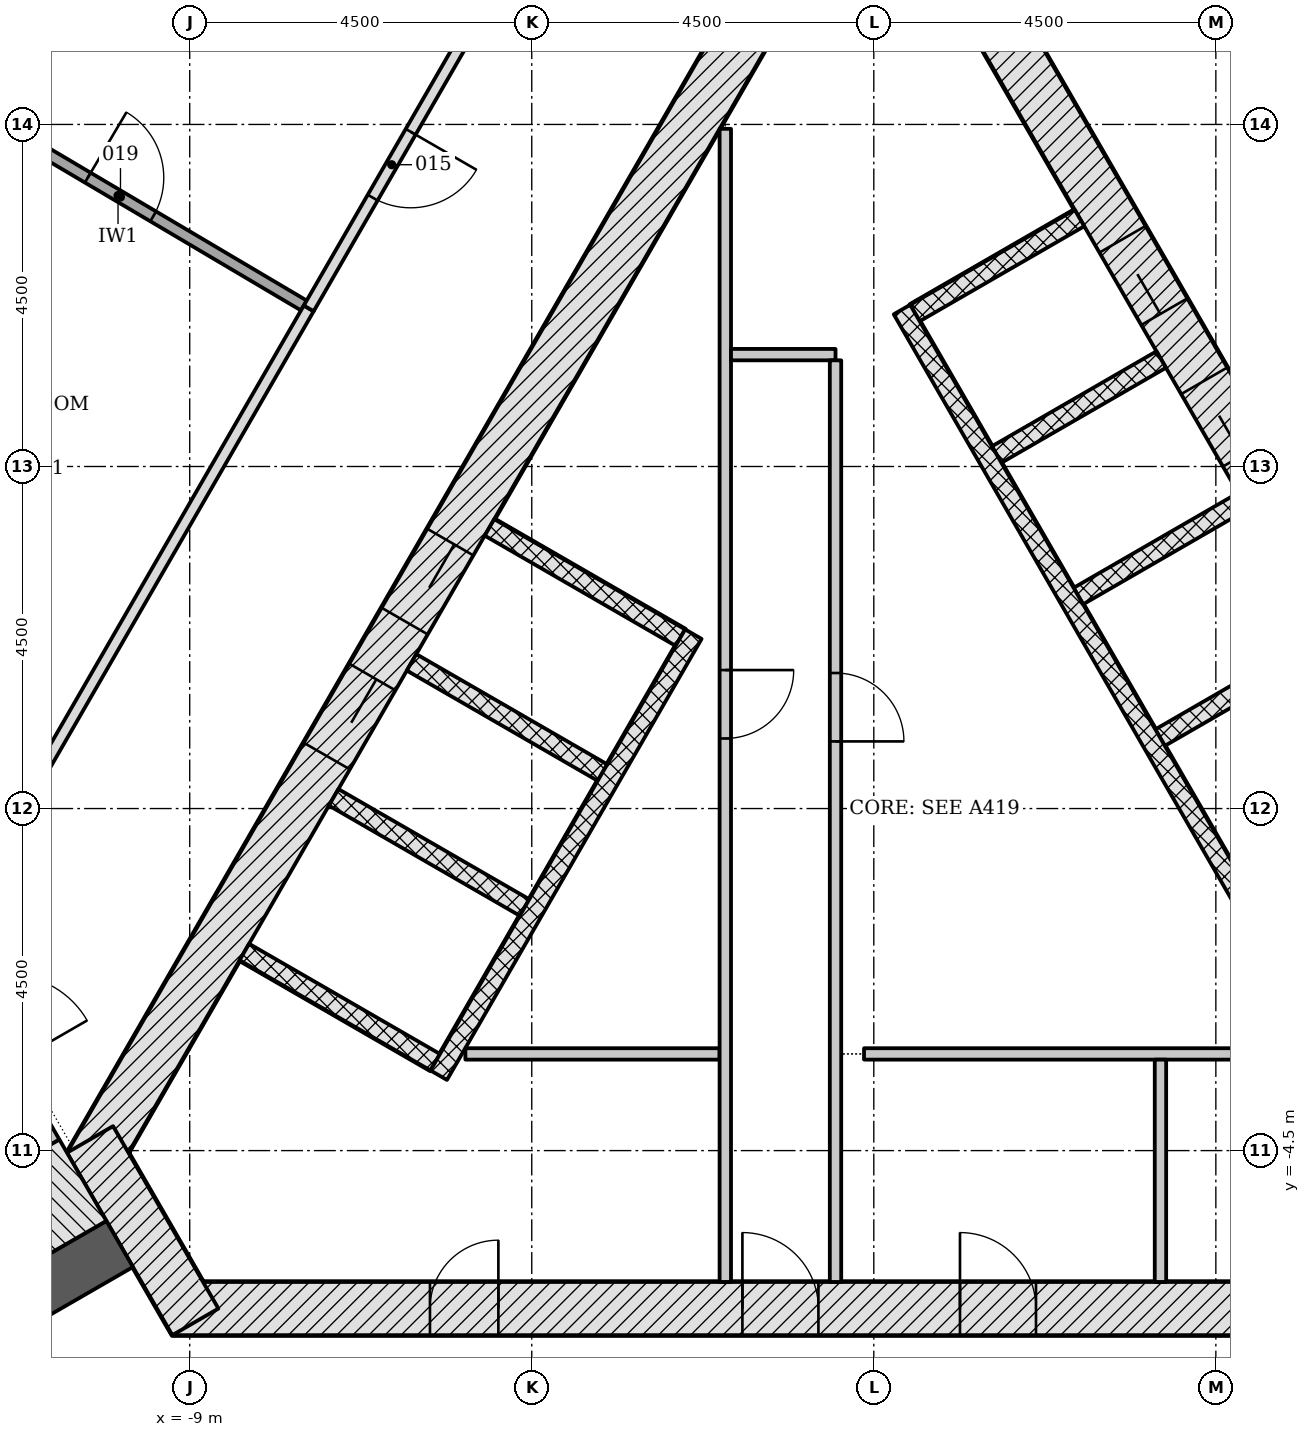
"""IFC4 building model, lengths in metres.
Left out: names, types, materials, properties, quantities, classifications, styles, units other than length and angle.
Written with IfcOpenShell. Run it as: python <this file> out.ifc"""

import sys

from ifc_helpers import new_model, si_unit, direction, frame, frame_2d, origin, place, context, subcontext, project, spatial, rectangle, extrude, element, fill, save


model = new_model("IFC4")
c1 = context("Model", 3, precision=1e-05, world=origin(), true_north=direction((0.0, 1.0)))
c2 = subcontext(c1, "Body", "Model", "MODEL_VIEW")
j1 = project(units=[si_unit("LENGTHUNIT", "METRE"), si_unit("PLANEANGLEUNIT", "RADIAN")], contexts=[c1])
p1 = place(None, origin())
s1 = spatial("IfcSite", under=j1, at=p1, CompositionType="ELEMENT")
p2 = place(p1, origin())
s2 = spatial("IfcBuilding", under=s1, at=p2, CompositionType="ELEMENT")
p3 = place(p2, frame((0.0, 0.0, 174.3)))
s3 = spatial("IfcBuildingStorey", under=s2, at=p3, CompositionType="ELEMENT", Elevation=174.3)
p4 = place(p3, frame((-9.229, -6.578, -0.2), z_axis=(0.0, 0.0, 1.0), x_axis=(1.0, 0.0, 0.0)))
e1 = element("IfcWall", 1, at=p4, inside=s3, PredefinedType="SHEAR", context=c2, shape_type="SweptSolid", body=[
    extrude(rectangle(XDim=18.458, YDim=0.7, at=frame_2d((9.229, 0.0))), origin(), (0.0, 0.0, 1.0), 3.6),
])
p5 = place(p4, frame((7.5, 0.0, 0.2)))
e2 = element("IfcOpeningElement", 2, at=p5, cuts=e1, PredefinedType="OPENING", context=c2, shape_type="SweptSolid", body=[
    extrude(rectangle(XDim=1.0, YDim=2.1, at=frame_2d((0.5, 1.05))), frame((0.0, 0.36, 0.0), z_axis=(0.0, -1.0, 0.0), x_axis=(1.0, 0.0, 0.0)), (0.0, 0.0, 1.0), 0.72),
])
p6 = place(p4, frame((3.389, 0.0, 0.2)))
e3 = element("IfcOpeningElement", 3, at=p6, cuts=e1, PredefinedType="OPENING", context=c2, shape_type="SweptSolid", body=[
    extrude(rectangle(XDim=0.9, YDim=2.1, at=frame_2d((0.45, 1.05))), frame((0.0, 0.36, 0.0), z_axis=(0.0, -1.0, 0.0), x_axis=(1.0, 0.0, 0.0)), (0.0, 0.0, 1.0), 0.72),
])
p7 = place(p4, frame((10.363, 0.0, 0.2)))
e4 = element("IfcOpeningElement", 4, at=p7, cuts=e1, PredefinedType="OPENING", context=c2, shape_type="SweptSolid", body=[
    extrude(rectangle(XDim=1.0, YDim=2.1, at=frame_2d((0.5, 1.05))), frame((0.0, 0.36, 0.0), z_axis=(0.0, -1.0, 0.0), x_axis=(1.0, 0.0, 0.0)), (0.0, 0.0, 1.0), 0.72),
])
p8 = place(p4, frame((15.077, 0.0, 0.2)))
e5 = element("IfcOpeningElement", 5, at=p8, cuts=e1, PredefinedType="OPENING", context=c2, shape_type="SweptSolid", body=[
    extrude(rectangle(XDim=0.9, YDim=2.1, at=frame_2d((0.45, 1.05))), frame((0.0, 0.36, 0.0), z_axis=(0.0, -1.0, 0.0), x_axis=(1.0, 0.0, 0.0)), (0.0, 0.0, 1.0), 0.72),
])
p9 = place(p3, frame((10.311, -4.703, -0.2), z_axis=(0.0, 0.0, 1.0), x_axis=(-0.500001446645, 0.866024568562, 0.0)))
e6 = element("IfcWall", 6, at=p9, inside=s3, PredefinedType="SHEAR", context=c2, shape_type="SweptSolid", body=[
    extrude(rectangle(XDim=18.458, YDim=0.7, at=frame_2d((9.229, 0.0))), origin(), (0.0, 0.0, 1.0), 3.6),
])
p10 = place(p9, frame((4.379, 0.0, 0.2)))
e7 = element("IfcOpeningElement", 7, at=p10, cuts=e6, PredefinedType="OPENING", context=c2, shape_type="SweptSolid", body=[
    extrude(rectangle(XDim=1.1, YDim=2.1, at=frame_2d((0.55, 1.05))), frame((0.0, 0.36, 0.0), z_axis=(0.0, -1.0, 0.0), x_axis=(1.0, 0.0, 0.0)), (0.0, 0.0, 1.0), 0.72),
])
p11 = place(p9, frame((6.529, 0.0, 0.2)))
e8 = element("IfcOpeningElement", 8, at=p11, cuts=e6, PredefinedType="OPENING", context=c2, shape_type="SweptSolid", body=[
    extrude(rectangle(XDim=1.1, YDim=2.1, at=frame_2d((0.55, 1.05))), frame((0.0, 0.36, 0.0), z_axis=(0.0, -1.0, 0.0), x_axis=(1.0, 0.0, 0.0)), (0.0, 0.0, 1.0), 0.72),
])
p12 = place(p9, frame((8.679, 0.0, 0.2)))
e9 = element("IfcOpeningElement", 9, at=p12, cuts=e6, PredefinedType="OPENING", context=c2, shape_type="SweptSolid", body=[
    extrude(rectangle(XDim=1.1, YDim=2.1, at=frame_2d((0.55, 1.05))), frame((0.0, 0.36, 0.0), z_axis=(0.0, -1.0, 0.0), x_axis=(1.0, 0.0, 0.0)), (0.0, 0.0, 1.0), 0.72),
])
p13 = place(p9, frame((10.829, 0.0, 0.2)))
e10 = element("IfcOpeningElement", 10, at=p13, cuts=e6, PredefinedType="OPENING", context=c2, shape_type="SweptSolid", body=[
    extrude(rectangle(XDim=1.1, YDim=2.1, at=frame_2d((0.55, 1.05))), frame((0.0, 0.36, 0.0), z_axis=(0.0, -1.0, 0.0), x_axis=(1.0, 0.0, 0.0)), (0.0, 0.0, 1.0), 0.72),
])
p14 = place(p9, frame((12.979, 0.0, 0.2)))
e11 = element("IfcOpeningElement", 11, at=p14, cuts=e6, PredefinedType="OPENING", context=c2, shape_type="SweptSolid", body=[
    extrude(rectangle(XDim=1.1, YDim=2.1, at=frame_2d((0.55, 1.05))), frame((0.0, 0.36, 0.0), z_axis=(0.0, -1.0, 0.0), x_axis=(1.0, 0.0, 0.0)), (0.0, 0.0, 1.0), 0.72),
])
p15 = place(p3, frame((-1.083, 11.281, -0.2), z_axis=(0.0, 0.0, 1.0), x_axis=(-0.500001446645, -0.866024568562, 0.0)))
e12 = element("IfcWall", 12, at=p15, inside=s3, PredefinedType="SHEAR", context=c2, shape_type="SweptSolid", body=[
    extrude(rectangle(XDim=18.458, YDim=0.7, at=frame_2d((9.229, 0.0))), origin(), (0.0, 0.0, 1.0), 3.6),
])
p16 = place(p15, frame((8.979, 0.0, 0.2)))
e13 = element("IfcOpeningElement", 13, at=p16, cuts=e12, PredefinedType="OPENING", context=c2, shape_type="SweptSolid", body=[
    extrude(rectangle(XDim=1.2, YDim=2.1, at=frame_2d((0.6, 1.05))), frame((0.0, 0.36, 0.0), z_axis=(0.0, -1.0, 0.0), x_axis=(1.0, 0.0, 0.0)), (0.0, 0.0, 1.0), 0.72),
])
p17 = place(p15, frame((11.029, 0.0, 0.2)))
e14 = element("IfcOpeningElement", 14, at=p17, cuts=e12, PredefinedType="OPENING", context=c2, shape_type="SweptSolid", body=[
    extrude(rectangle(XDim=1.2, YDim=2.1, at=frame_2d((0.6, 1.05))), frame((0.0, 0.36, 0.0), z_axis=(0.0, -1.0, 0.0), x_axis=(1.0, 0.0, 0.0)), (0.0, 0.0, 1.0), 0.72),
])
p18 = place(p3, frame((-10.311, -4.353, -0.2), z_axis=(0.0, 0.0, 1.0), x_axis=(0.500042739161, -0.866000726912, 0.0)))
e15 = element("IfcWall", 15, at=p18, inside=s3, PredefinedType="SHEAR", context=c2, shape_type="SweptSolid", body=[
    extrude(rectangle(XDim=2.771, YDim=0.7, at=frame_2d((1.386, 0.0))), origin(), (0.0, 0.0, 1.0), 3.6),
])
p19 = place(p3, frame((-9.922, -5.728, -0.2), z_axis=(0.0, 0.0, 1.0), x_axis=(-0.866029553954, -0.499992811627, 0.0)))
e16 = element("IfcWall", 16, at=p19, inside=s3, PredefinedType="SHEAR", context=c2, shape_type="SweptSolid", body=[
    extrude(rectangle(XDim=9.927, YDim=0.7, at=frame_2d((4.964, 0.0))), origin(), (0.0, 0.0, 1.0), 3.6),
])
p20 = place(p3, frame((5.931, 2.183, -0.2), z_axis=(0.0, 0.0, 1.0), x_axis=(-0.866047370643, -0.499961950354, 0.0)))
e17 = element("IfcWall", 17, at=p20, inside=s3, PredefinedType="PARTITIONING", context=c2, shape_type="SweptSolid", body=[
    extrude(rectangle(XDim=2.5, YDim=0.25, at=frame_2d((1.25, 0.0))), origin(), (0.0, 0.0, 1.0), 3.6),
])
for number, where, z_axis, x_axis in (
    (18, (4.856, 4.045, -0.2), (0.0, 0.0, 1.0), (-0.866, -0.5, 0.0)),
    (19, (3.781, 5.907, -0.2), (0.0, 0.0, 1.0), (-0.866, -0.5, 0.0)),
    (20, (2.706, 7.769, -0.2), (0.0, 0.0, 1.0), (-0.866, -0.5, 0.0)),
):
    element("IfcWall", number, at=place(p3, frame(where, z_axis=z_axis, x_axis=x_axis)), inside=s3, PredefinedType="PARTITIONING", context=c2, shape_type="SweptSolid", body=[
        extrude(rectangle(XDim=2.5, YDim=0.25, at=frame_2d((1.25, 0.0))), origin(), (0.0, 0.0, 1.0), 3.6),
    ])
p21 = place(p3, frame((5.87, -2.961, 0.0), z_axis=(0.0, 0.0, 1.0), x_axis=(-0.50000615651, 0.866021849293, 0.0)))
e21 = element("IfcWall", 21, at=p21, inside=s3, PredefinedType="PARTITIONING", context=c2, shape_type="SweptSolid", body=[
    extrude(rectangle(XDim=11.0, YDim=0.25, at=frame_2d((5.5, 0.0))), origin(), (0.0, 0.0, 1.0), 3.4),
])
for number, where, z_axis, x_axis in (
    (22, (-5.056, 3.699, -0.2), (0.0, 0.0, 1.0), (0.866, -0.5, 0.0)),
    (23, (-6.081, 1.923, -0.2), (0.0, 0.0, 1.0), (0.866, -0.5, 0.0)),
    (24, (-7.106, 0.148, -0.2), (0.0, 0.0, 1.0), (0.866, -0.5, 0.0)),
    (25, (-8.281, -1.887, -0.2), (0.0, 0.0, 1.0), (0.866, -0.5, 0.0)),
):
    element("IfcWall", number, at=place(p3, frame(where, z_axis=z_axis, x_axis=x_axis)), inside=s3, PredefinedType="PARTITIONING", context=c2, shape_type="SweptSolid", body=[
        extrude(rectangle(XDim=2.9, YDim=0.25, at=frame_2d((1.45, 0.0))), origin(), (0.0, 0.0, 1.0), 3.6),
    ])
p22 = place(p3, frame((-2.374, 2.294, 0.0), z_axis=(0.0, 0.0, 1.0), x_axis=(-0.500003174267, -0.866023571113, 0.0)))
e26 = element("IfcWall", 26, at=p22, inside=s3, PredefinedType="PARTITIONING", context=c2, shape_type="SweptSolid", body=[
    extrude(rectangle(XDim=6.7, YDim=0.25, at=frame_2d((3.35, 0.0))), origin(), (0.0, 0.0, 1.0), 3.4),
])
p23 = place(p3, frame((-5.373, -3.228, 0.0), z_axis=(0.0, 0.0, 1.0), x_axis=(1.0, 0.0, 0.0)))
e27 = element("IfcWall", 27, at=p23, inside=s3, PredefinedType="PARTITIONING", context=c2, shape_type="SweptSolid", body=[
    extrude(rectangle(XDim=3.344, YDim=0.15, at=frame_2d((1.672, 0.0))), origin(), (0.0, 0.0, 1.0), 3.4),
])
p24 = place(p3, frame((-1.954, 8.942, 0.0), z_axis=(0.0, 0.0, 1.0), x_axis=(0.0, -1.0, 0.0)))
e28 = element("IfcWall", 28, at=p24, inside=s3, PredefinedType="PARTITIONING", context=c2, shape_type="SweptSolid", body=[
    extrude(rectangle(XDim=15.171, YDim=0.15, at=frame_2d((7.585, 0.0))), origin(), (0.0, 0.0, 1.0), 3.4),
])
p25 = place(p24, frame((7.121, 0.0, 0.0)))
e29 = element("IfcOpeningElement", 29, at=p25, cuts=e28, PredefinedType="OPENING", context=c2, shape_type="SweptSolid", body=[
    extrude(rectangle(XDim=0.9, YDim=2.1, at=frame_2d((0.45, 1.05))), frame((0.0, 0.085, 0.0), z_axis=(0.0, -1.0, 0.0), x_axis=(1.0, 0.0, 0.0)), (0.0, 0.0, 1.0), 0.17),
])
p26 = place(p3, frame((-1.879, 5.972, 0.0), z_axis=(0.0, 0.0, 1.0), x_axis=(1.0, 0.0, 0.0)))
e30 = element("IfcWall", 30, at=p26, inside=s3, PredefinedType="PARTITIONING", context=c2, shape_type="SweptSolid", body=[
    extrude(rectangle(XDim=1.375, YDim=0.15, at=frame_2d((0.688, 0.0))), origin(), (0.0, 0.0, 1.0), 3.4),
])
p27 = place(p3, frame((-0.504, 5.897, 0.0), z_axis=(0.0, 0.0, 1.0), x_axis=(0.0, -1.0, 0.0)))
e31 = element("IfcWall", 31, at=p27, inside=s3, PredefinedType="PARTITIONING", context=c2, shape_type="SweptSolid", body=[
    extrude(rectangle(XDim=12.125, YDim=0.15, at=frame_2d((6.062, 0.0))), origin(), (0.0, 0.0, 1.0), 3.4),
])
p28 = place(p27, frame((4.114, 0.0, 0.0)))
e32 = element("IfcOpeningElement", 32, at=p28, cuts=e31, PredefinedType="OPENING", context=c2, shape_type="SweptSolid", body=[
    extrude(rectangle(XDim=0.9, YDim=2.1, at=frame_2d((0.45, 1.05))), frame((0.0, 0.085, 0.0), z_axis=(0.0, -1.0, 0.0), x_axis=(1.0, 0.0, 0.0)), (0.0, 0.0, 1.0), 0.17),
])
p29 = place(p3, frame((-0.129, -3.228, 0.0), z_axis=(0.0, 0.0, 1.0), x_axis=(1.0, 0.0, 0.0)))
e33 = element("IfcWall", 33, at=p29, inside=s3, PredefinedType="PARTITIONING", context=c2, shape_type="SweptSolid", body=[
    extrude(rectangle(XDim=9.139, YDim=0.15, at=frame_2d((4.57, 0.0))), origin(), (0.0, 0.0, 1.0), 3.4),
])
p30 = place(p3, frame((3.771, -3.303, 0.0), z_axis=(0.0, 0.0, 1.0), x_axis=(0.0, -1.0, 0.0)))
e34 = element("IfcWall", 34, at=p30, inside=s3, PredefinedType="PARTITIONING", context=c2, shape_type="SweptSolid", body=[
    extrude(rectangle(XDim=2.925, YDim=0.15, at=frame_2d((1.462, 0.0))), origin(), (0.0, 0.0, 1.0), 3.4),
])
p31 = place(p3, frame((-12.576, -1.331, -0.2), z_axis=(0.0, 0.0, 1.0), x_axis=(0.499970499736, -0.8660424351, 0.0)))
e35 = element("IfcWall", 35, at=p31, inside=s3, PredefinedType="SHEAR", context=c2, shape_type="SweptSolid", body=[
    extrude(rectangle(XDim=3.55, YDim=0.2, at=frame_2d((1.775, 0.0))), origin(), (0.0, 0.0, 1.0), 3.6),
])
p32 = place(p31, frame((1.175, 0.0, 0.2)))
e36 = element("IfcOpeningElement", 36, at=p32, cuts=e35, PredefinedType="OPENING", context=c2, shape_type="SweptSolid", body=[
    extrude(rectangle(XDim=1.2, YDim=2.1, at=frame_2d((0.6, 1.05))), frame((0.0, 0.11, 0.0), z_axis=(0.0, -1.0, 0.0), x_axis=(1.0, 0.0, 0.0)), (0.0, 0.0, 1.0), 0.22),
])
p33 = place(p3, frame((-10.406, -4.89, -0.2), z_axis=(0.0, 0.0, 1.0), x_axis=(-0.866018442252, -0.500012057535, 0.0)))
e37 = element("IfcWall", 37, at=p33, inside=s3, PredefinedType="SHEAR", context=c2, shape_type="SweptSolid", body=[
    extrude(rectangle(XDim=7.2, YDim=1.236, at=frame_2d((3.6, 0.0))), origin(), (0.0, 0.0, 1.0), 3.6),
])
p34 = place(p3, frame((15.807, -8.722, 0.0), z_axis=(0.0, 0.0, 1.0), x_axis=(-0.500001078133, 0.866024781323, 0.0)))
e38 = element("IfcWall", 38, at=p34, inside=s3, PredefinedType="PARTITIONING", context=c2, shape_type="SweptSolid", body=[
    extrude(rectangle(XDim=23.185, YDim=0.15, at=frame_2d((11.592, 0.0))), origin(), (0.0, 0.0, 1.0), 2.847),
])
p35 = place(p34, frame((10.551, 0.0, 0.0)))
e39 = element("IfcOpeningElement", 39, at=p35, cuts=e38, PredefinedType="OPENING", context=c2, shape_type="SweptSolid", body=[
    extrude(rectangle(XDim=1.5, YDim=2.1, at=frame_2d((0.75, 1.05))), frame((0.0, 0.085, 0.0), z_axis=(0.0, -1.0, 0.0), x_axis=(1.0, 0.0, 0.0)), (0.0, 0.0, 1.0), 0.17),
])
p36 = place(p34, frame((17.335, 0.0, 0.0)))
e40 = element("IfcOpeningElement", 40, at=p36, cuts=e38, PredefinedType="OPENING", context=c2, shape_type="SweptSolid", body=[
    extrude(rectangle(XDim=1.0, YDim=2.1, at=frame_2d((0.5, 1.05))), frame((0.0, 0.085, 0.0), z_axis=(0.0, -1.0, 0.0), x_axis=(1.0, 0.0, 0.0)), (0.0, 0.0, 1.0), 0.17),
])
p37 = place(p3, frame((-7.434, 6.58, 0.0), z_axis=(0.0, 0.0, 1.0), x_axis=(-0.499998195608, -0.866026445548, 0.0)))
e41 = element("IfcWall", 41, at=p37, inside=s3, PredefinedType="PARTITIONING", context=c2, shape_type="SweptSolid", body=[
    extrude(rectangle(XDim=9.478, YDim=0.15, at=frame_2d((4.739, 0.0))), origin(), (0.0, 0.0, 1.0), 2.847),
])
p38 = place(p3, frame((-12.388, 9.51, 0.0), z_axis=(0.0, 0.0, 1.0), x_axis=(0.860691995407, -0.509126005073, 0.0)))
e42 = element("IfcWall", 42, at=p38, inside=s3, PredefinedType="PARTITIONING", context=c2, shape_type="SweptSolid", body=[
    extrude(rectangle(XDim=5.68, YDim=0.15, at=frame_2d((2.84, 0.0))), origin(), (0.0, 0.0, 1.0), 3.4),
])
p39 = place(p38, frame((2.378, 0.0, 0.0)))
e43 = element("IfcOpeningElement", 43, at=p39, cuts=e42, PredefinedType="OPENING", context=c2, shape_type="SweptSolid", body=[
    extrude(rectangle(XDim=1.0, YDim=2.1, at=frame_2d((0.5, 1.05))), frame((0.0, 0.085, 0.0), z_axis=(0.0, -1.0, 0.0), x_axis=(1.0, 0.0, 0.0)), (0.0, 0.0, 1.0), 0.17),
])
p40 = place(p3, frame((-5.251, 10.36, 0.0), z_axis=(0.0, 0.0, 1.0), x_axis=(-0.500012937857, -0.86601793398, 0.0)))
e44 = element("IfcWall", 44, at=p40, inside=s3, PredefinedType="PARTITIONING", context=c2, shape_type="SweptSolid", body=[
    extrude(rectangle(XDim=4.365, YDim=0.15, at=frame_2d((2.183, 0.0))), origin(), (0.0, 0.0, 1.0), 2.847),
])
p41 = place(p40, frame((1.683, 0.0, 0.0)))
e45 = element("IfcOpeningElement", 45, at=p41, cuts=e44, PredefinedType="OPENING", context=c2, shape_type="SweptSolid", body=[
    extrude(rectangle(XDim=1.0, YDim=2.1, at=frame_2d((0.5, 1.05))), frame((0.0, 0.085, 0.0), z_axis=(0.0, -1.0, 0.0), x_axis=(1.0, 0.0, 0.0)), (0.0, 0.0, 1.0), 0.17),
])
p42 = place(p13, origin())
e46 = element("IfcDoor", 46, at=p42, inside=s3, OperationType="DOUBLE_DOOR_SLIDING", PredefinedType="DOOR", context=c2, shape_type="SweptSolid", body=[
    extrude(rectangle(XDim=1.1, YDim=2.1, at=frame_2d((0.55, 1.05))), frame((0.0, 0.025, 0.0), z_axis=(0.0, -1.0, 0.0), x_axis=(1.0, 0.0, 0.0)), (0.0, 0.0, 1.0), 0.05),
])
fill(e10, e46)
p43 = place(p14, origin())
e47 = element("IfcDoor", 47, at=p43, inside=s3, OperationType="DOUBLE_DOOR_SLIDING", PredefinedType="DOOR", context=c2, shape_type="SweptSolid", body=[
    extrude(rectangle(XDim=1.1, YDim=2.1, at=frame_2d((0.55, 1.05))), frame((0.0, 0.025, 0.0), z_axis=(0.0, -1.0, 0.0), x_axis=(1.0, 0.0, 0.0)), (0.0, 0.0, 1.0), 0.05),
])
fill(e11, e47)
p44 = place(p16, origin())
e48 = element("IfcDoor", 48, at=p44, inside=s3, OperationType="DOUBLE_DOOR_SLIDING", PredefinedType="DOOR", context=c2, shape_type="SweptSolid", body=[
    extrude(rectangle(XDim=1.2, YDim=2.1, at=frame_2d((0.6, 1.05))), frame((0.0, 0.025, 0.0), z_axis=(0.0, -1.0, 0.0), x_axis=(1.0, 0.0, 0.0)), (0.0, 0.0, 1.0), 0.05),
])
fill(e13, e48)
p45 = place(p17, origin())
e49 = element("IfcDoor", 49, at=p45, inside=s3, OperationType="DOUBLE_DOOR_SLIDING", PredefinedType="DOOR", context=c2, shape_type="SweptSolid", body=[
    extrude(rectangle(XDim=1.2, YDim=2.1, at=frame_2d((0.6, 1.05))), frame((0.0, 0.025, 0.0), z_axis=(0.0, -1.0, 0.0), x_axis=(1.0, 0.0, 0.0)), (0.0, 0.0, 1.0), 0.05),
])
fill(e14, e49)
p46 = place(p5, origin())
e50 = element("IfcDoor", 50, at=p46, inside=s3, OperationType="SINGLE_SWING_LEFT", PredefinedType="DOOR", context=c2, shape_type="SweptSolid", body=[
    extrude(rectangle(XDim=1.0, YDim=2.1, at=frame_2d((0.5, 1.05))), frame((0.0, 0.075, 0.0), z_axis=(0.0, -1.0, 0.0), x_axis=(1.0, 0.0, 0.0)), (0.0, 0.0, 1.0), 0.15),
])
fill(e2, e50)
p47 = place(p6, origin())
e51 = element("IfcDoor", 51, at=p47, inside=s3, OperationType="SINGLE_SWING_RIGHT", PredefinedType="DOOR", context=c2, shape_type="SweptSolid", body=[
    extrude(rectangle(XDim=0.9, YDim=2.1, at=frame_2d((0.45, 1.05))), frame((0.0, 0.075, 0.0), z_axis=(0.0, -1.0, 0.0), x_axis=(1.0, 0.0, 0.0)), (0.0, 0.0, 1.0), 0.15),
])
fill(e3, e51)
p48 = place(p7, origin())
e52 = element("IfcDoor", 52, at=p48, inside=s3, OperationType="SINGLE_SWING_LEFT", PredefinedType="DOOR", context=c2, shape_type="SweptSolid", body=[
    extrude(rectangle(XDim=1.0, YDim=2.1, at=frame_2d((0.5, 1.05))), frame((0.0, 0.075, 0.0), z_axis=(0.0, -1.0, 0.0), x_axis=(1.0, 0.0, 0.0)), (0.0, 0.0, 1.0), 0.15),
])
fill(e4, e52)
p49 = place(p25, origin())
e53 = element("IfcDoor", 53, at=p49, inside=s3, OperationType="SINGLE_SWING_LEFT", PredefinedType="DOOR", context=c2, shape_type="SweptSolid", body=[
    extrude(rectangle(XDim=0.9, YDim=2.1, at=frame_2d((0.45, 1.05))), frame((0.0, 0.025, 0.0), z_axis=(0.0, -1.0, 0.0), x_axis=(1.0, 0.0, 0.0)), (0.0, 0.0, 1.0), 0.05),
])
fill(e29, e53)
p50 = place(p28, origin())
e54 = element("IfcDoor", 54, at=p50, inside=s3, OperationType="SINGLE_SWING_RIGHT", PredefinedType="DOOR", context=c2, shape_type="SweptSolid", body=[
    extrude(rectangle(XDim=0.9, YDim=2.1, at=frame_2d((0.45, 1.05))), frame((0.0, 0.025, 0.0), z_axis=(0.0, -1.0, 0.0), x_axis=(1.0, 0.0, 0.0)), (0.0, 0.0, 1.0), 0.05),
])
fill(e32, e54)
p51 = place(p41, origin())
e55 = element("IfcDoor", 55, at=p51, inside=s3, OperationType="SINGLE_SWING_LEFT", PredefinedType="DOOR", context=c2, shape_type="SweptSolid", body=[
    extrude(rectangle(XDim=1.0, YDim=2.1, at=frame_2d((0.5, 1.05))), frame((0.0, 0.025, 0.0), z_axis=(0.0, -1.0, 0.0), x_axis=(1.0, 0.0, 0.0)), (0.0, 0.0, 1.0), 0.05),
])
fill(e45, e55)
p52 = place(p39, origin())
e56 = element("IfcDoor", 56, at=p52, inside=s3, OperationType="SINGLE_SWING_LEFT", PredefinedType="DOOR", context=c2, shape_type="SweptSolid", body=[
    extrude(rectangle(XDim=1.0, YDim=2.1, at=frame_2d((0.5, 1.05))), frame((0.0, 0.025, 0.0), z_axis=(0.0, -1.0, 0.0), x_axis=(1.0, 0.0, 0.0)), (0.0, 0.0, 1.0), 0.05),
])
fill(e43, e56)
save(model, sys.argv[1])
